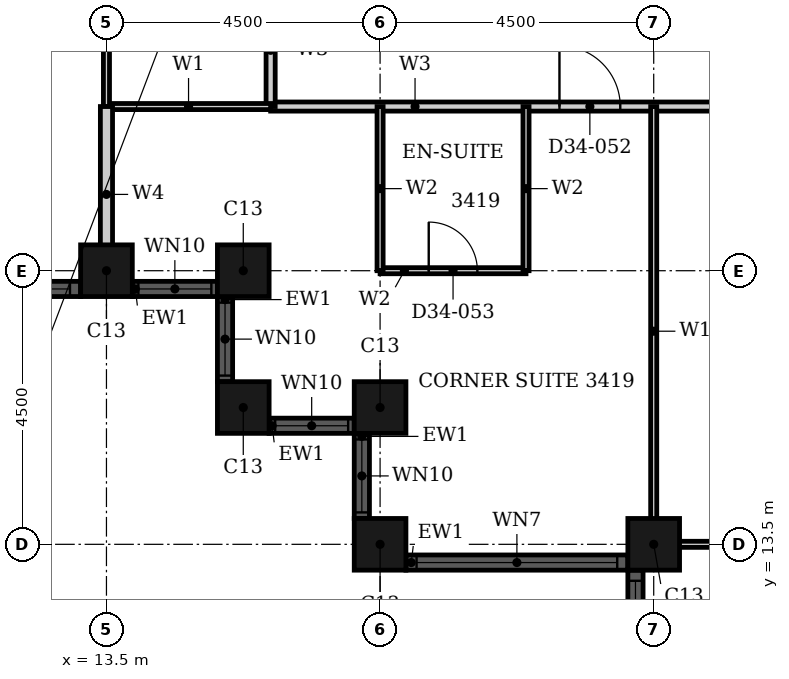
"""IFC4 building model, lengths in metres.
Left out: names, types, materials, properties, quantities, classifications, styles, units other than length and angle.
Written with IfcOpenShell. Run it as: python <this file> out.ifc"""

import sys

from ifc_helpers import new_model, si_unit, direction, frame, frame_2d, origin, origin_2d, place, context, subcontext, project, spatial, rectangle, hollow_rectangle, extrude, element, fill, save


model = new_model("IFC4")
c1 = context("Model", 3, precision=1e-05, world=origin(), true_north=direction((0.0, 1.0)))
c2 = subcontext(c1, "Body", "Model", "MODEL_VIEW")
j1 = project(units=[si_unit("LENGTHUNIT", "METRE"), si_unit("PLANEANGLEUNIT", "RADIAN")], contexts=[c1])
p1 = place(None, origin())
s1 = spatial("IfcSite", under=j1, at=p1, CompositionType="ELEMENT")
p2 = place(p1, origin())
s2 = spatial("IfcBuilding", under=s1, at=p2, CompositionType="ELEMENT")
p3 = place(p2, frame((0.0, 0.0, 136.8)))
s3 = spatial("IfcBuildingStorey", under=s2, at=p3, CompositionType="ELEMENT", Elevation=136.8)
for number, where, z_axis, x_axis in (
    (1, (13.5, 18.0, 0.0), (0.0, 0.0, 1.0), (1.0, 0.0, 0.0)),
    (2, (15.75, 18.0, 0.0), (0.0, 0.0, 1.0), (1.0, 0.0, 0.0)),
    (3, (15.75, 15.75, 0.0), (0.0, 0.0, 1.0), (1.0, 0.0, 0.0)),
    (4, (18.0, 15.75, 0.0), (0.0, 0.0, 1.0), (1.0, 0.0, 0.0)),
    (5, (18.0, 13.5, 0.0), (0.0, 0.0, 1.0), (1.0, 0.0, 0.0)),
    (6, (22.5, 13.5, 0.0), (0.0, 0.0, 1.0), (1.0, 0.0, 0.0)),
):
    element("IfcColumn", number, at=place(p3, frame(where, z_axis=z_axis, x_axis=x_axis)), inside=s3, PredefinedType="COLUMN", context=c2, shape_type="SweptSolid", body=[
        extrude(hollow_rectangle(XDim=0.85, YDim=0.85, WallThickness=0.026, at=origin_2d()), origin(), (0.0, 0.0, 1.0), 3.6),
    ])
p4 = place(p3, frame((4.925, 17.7, 0.0), z_axis=(0.0, 0.0, 1.0), x_axis=(1.0, 0.0, 0.0)))
e7 = element("IfcWall", 7, at=p4, inside=s3, PredefinedType="SOLIDWALL", context=c2, shape_type="SweptSolid", body=[
    extrude(rectangle(XDim=8.15, YDim=0.25, at=frame_2d((4.075, 0.0))), origin(), (0.0, 0.0, 1.0), 3.6),
])
p5 = place(p4, frame((0.175, 0.0, 0.9)))
e8 = element("IfcOpeningElement", 8, at=p5, cuts=e7, PredefinedType="OPENING", context=c2, shape_type="SweptSolid", body=[
    extrude(rectangle(XDim=3.3, YDim=1.85, at=frame_2d((1.65, 0.925))), frame((0.0, 0.135, 0.0), z_axis=(0.0, -1.0, 0.0), x_axis=(1.0, 0.0, 0.0)), (0.0, 0.0, 1.0), 0.27),
])
p6 = place(p4, frame((4.675, 0.0, 0.9)))
e9 = element("IfcOpeningElement", 9, at=p6, cuts=e7, PredefinedType="OPENING", context=c2, shape_type="SweptSolid", body=[
    extrude(rectangle(XDim=3.3, YDim=1.85, at=frame_2d((1.65, 0.925))), frame((0.0, 0.135, 0.0), z_axis=(0.0, -1.0, 0.0), x_axis=(1.0, 0.0, 0.0)), (0.0, 0.0, 1.0), 0.27),
])
p7 = place(p3, frame((13.925, 17.7, 0.0), z_axis=(0.0, 0.0, 1.0), x_axis=(1.0, 0.0, 0.0)))
e10 = element("IfcWall", 10, at=p7, inside=s3, PredefinedType="SOLIDWALL", context=c2, shape_type="SweptSolid", body=[
    extrude(rectangle(XDim=1.4, YDim=0.25, at=frame_2d((0.7, 0.0))), origin(), (0.0, 0.0, 1.0), 3.6),
])
p8 = place(p7, frame((0.1, 0.0, 0.9)))
e11 = element("IfcOpeningElement", 11, at=p8, cuts=e10, PredefinedType="OPENING", context=c2, shape_type="SweptSolid", body=[
    extrude(rectangle(XDim=1.2, YDim=1.85, at=frame_2d((0.6, 0.925))), frame((0.0, 0.135, 0.0), z_axis=(0.0, -1.0, 0.0), x_axis=(1.0, 0.0, 0.0)), (0.0, 0.0, 1.0), 0.27),
])
p9 = place(p3, frame((15.45, 17.575, 0.0), z_axis=(0.0, 0.0, 1.0), x_axis=(0.0, -1.0, 0.0)))
e12 = element("IfcWall", 12, at=p9, inside=s3, PredefinedType="SOLIDWALL", context=c2, shape_type="SweptSolid", body=[
    extrude(rectangle(XDim=1.4, YDim=0.25, at=frame_2d((0.7, 0.0))), origin(), (0.0, 0.0, 1.0), 3.6),
])
p10 = place(p9, frame((0.1, 0.0, 0.9)))
e13 = element("IfcOpeningElement", 13, at=p10, cuts=e12, PredefinedType="OPENING", context=c2, shape_type="SweptSolid", body=[
    extrude(rectangle(XDim=1.2, YDim=1.85, at=frame_2d((0.6, 0.925))), frame((0.0, 0.135, 0.0), z_axis=(0.0, -1.0, 0.0), x_axis=(1.0, 0.0, 0.0)), (0.0, 0.0, 1.0), 0.27),
])
p11 = place(p3, frame((16.175, 15.45, 0.0), z_axis=(0.0, 0.0, 1.0), x_axis=(1.0, 0.0, 0.0)))
e14 = element("IfcWall", 14, at=p11, inside=s3, PredefinedType="SOLIDWALL", context=c2, shape_type="SweptSolid", body=[
    extrude(rectangle(XDim=1.4, YDim=0.25, at=frame_2d((0.7, 0.0))), origin(), (0.0, 0.0, 1.0), 3.6),
])
p12 = place(p11, frame((0.1, 0.0, 0.9)))
e15 = element("IfcOpeningElement", 15, at=p12, cuts=e14, PredefinedType="OPENING", context=c2, shape_type="SweptSolid", body=[
    extrude(rectangle(XDim=1.2, YDim=1.85, at=frame_2d((0.6, 0.925))), frame((0.0, 0.135, 0.0), z_axis=(0.0, -1.0, 0.0), x_axis=(1.0, 0.0, 0.0)), (0.0, 0.0, 1.0), 0.27),
])
p13 = place(p3, frame((17.7, 15.325, 0.0), z_axis=(0.0, 0.0, 1.0), x_axis=(0.0, -1.0, 0.0)))
e16 = element("IfcWall", 16, at=p13, inside=s3, PredefinedType="SOLIDWALL", context=c2, shape_type="SweptSolid", body=[
    extrude(rectangle(XDim=1.4, YDim=0.25, at=frame_2d((0.7, 0.0))), origin(), (0.0, 0.0, 1.0), 3.6),
])
p14 = place(p13, frame((0.1, 0.0, 0.9)))
e17 = element("IfcOpeningElement", 17, at=p14, cuts=e16, PredefinedType="OPENING", context=c2, shape_type="SweptSolid", body=[
    extrude(rectangle(XDim=1.2, YDim=1.85, at=frame_2d((0.6, 0.925))), frame((0.0, 0.135, 0.0), z_axis=(0.0, -1.0, 0.0), x_axis=(1.0, 0.0, 0.0)), (0.0, 0.0, 1.0), 0.27),
])
p15 = place(p3, frame((18.425, 13.2, 0.0), z_axis=(0.0, 0.0, 1.0), x_axis=(1.0, 0.0, 0.0)))
e18 = element("IfcWall", 18, at=p15, inside=s3, PredefinedType="SOLIDWALL", context=c2, shape_type="SweptSolid", body=[
    extrude(rectangle(XDim=3.65, YDim=0.25, at=frame_2d((1.825, 0.0))), origin(), (0.0, 0.0, 1.0), 3.6),
])
p16 = place(p15, frame((0.175, 0.0, 0.9)))
e19 = element("IfcOpeningElement", 19, at=p16, cuts=e18, PredefinedType="OPENING", context=c2, shape_type="SweptSolid", body=[
    extrude(rectangle(XDim=3.3, YDim=1.85, at=frame_2d((1.65, 0.925))), frame((0.0, 0.135, 0.0), z_axis=(0.0, -1.0, 0.0), x_axis=(1.0, 0.0, 0.0)), (0.0, 0.0, 1.0), 0.27),
])
p17 = place(p3, frame((22.2, 13.075, 0.0), z_axis=(0.0, 0.0, 1.0), x_axis=(0.0, -1.0, 0.0)))
e20 = element("IfcWall", 20, at=p17, inside=s3, PredefinedType="SOLIDWALL", context=c2, shape_type="SweptSolid", body=[
    extrude(rectangle(XDim=8.15, YDim=0.25, at=frame_2d((4.075, 0.0))), origin(), (0.0, 0.0, 1.0), 3.6),
])
p18 = place(p17, frame((0.175, 0.0, 0.9)))
e21 = element("IfcOpeningElement", 21, at=p18, cuts=e20, PredefinedType="OPENING", context=c2, shape_type="SweptSolid", body=[
    extrude(rectangle(XDim=3.3, YDim=1.85, at=frame_2d((1.65, 0.925))), frame((0.0, 0.135, 0.0), z_axis=(0.0, -1.0, 0.0), x_axis=(1.0, 0.0, 0.0)), (0.0, 0.0, 1.0), 0.27),
])
p19 = place(p17, frame((4.675, 0.0, 0.9)))
e22 = element("IfcOpeningElement", 22, at=p19, cuts=e20, PredefinedType="OPENING", context=c2, shape_type="SweptSolid", body=[
    extrude(rectangle(XDim=3.3, YDim=1.85, at=frame_2d((1.65, 0.925))), frame((0.0, 0.135, 0.0), z_axis=(0.0, -1.0, 0.0), x_axis=(1.0, 0.0, 0.0)), (0.0, 0.0, 1.0), 0.27),
])
p20 = place(p3, frame((16.2, 20.7, 0.0), z_axis=(0.0, 0.0, 1.0), x_axis=(1.0, 0.0, 0.0)))
e23 = element("IfcWall", 23, at=p20, inside=s3, PredefinedType="PARTITIONING", context=c2, shape_type="SweptSolid", body=[
    extrude(rectangle(XDim=13.5, YDim=0.15, at=frame_2d((6.75, 0.0))), origin(), (0.0, 0.0, 1.0), 3.2),
])
p21 = place(p20, frame((4.75, 0.0, 0.0)))
e24 = element("IfcOpeningElement", 24, at=p21, cuts=e23, PredefinedType="OPENING", context=c2, shape_type="SweptSolid", body=[
    extrude(rectangle(XDim=1.0, YDim=2.1, at=frame_2d((0.5, 1.05))), frame((0.0, 0.085, 0.0), z_axis=(0.0, -1.0, 0.0), x_axis=(1.0, 0.0, 0.0)), (0.0, 0.0, 1.0), 0.17),
])
p22 = place(p20, frame((9.45, 0.0, 0.0)))
e25 = element("IfcOpeningElement", 25, at=p22, cuts=e23, PredefinedType="OPENING", context=c2, shape_type="SweptSolid", body=[
    extrude(rectangle(XDim=0.9, YDim=2.1, at=frame_2d((0.45, 1.05))), frame((0.0, 0.085, 0.0), z_axis=(0.0, -1.0, 0.0), x_axis=(1.0, 0.0, 0.0)), (0.0, 0.0, 1.0), 0.17),
])
p23 = place(p3, frame((16.2, 20.7, 0.0), z_axis=(0.0, 0.0, 1.0), x_axis=(0.0, 1.0, 0.0)))
e26 = element("IfcWall", 26, at=p23, inside=s3, PredefinedType="PARTITIONING", context=c2, shape_type="SweptSolid", body=[
    extrude(rectangle(XDim=4.5, YDim=0.15, at=frame_2d((2.25, 0.0))), origin(), (0.0, 0.0, 1.0), 3.2),
])
p24 = place(p23, frame((1.85, 0.0, 0.0)))
e27 = element("IfcOpeningElement", 27, at=p24, cuts=e26, PredefinedType="OPENING", context=c2, shape_type="SweptSolid", body=[
    extrude(rectangle(XDim=0.9, YDim=2.1, at=frame_2d((0.45, 1.05))), frame((0.0, 0.085, 0.0), z_axis=(0.0, -1.0, 0.0), x_axis=(1.0, 0.0, 0.0)), (0.0, 0.0, 1.0), 0.17),
])
p25 = place(p3, frame((22.31, 13.5, 0.0), z_axis=(0.0, 0.0, 1.0), x_axis=(1.0, 0.0, 0.0)))
e28 = element("IfcWall", 28, at=p25, inside=s3, PredefinedType="PARTITIONING", context=c2, shape_type="SweptSolid", body=[
    extrude(rectangle(XDim=7.39, YDim=0.1, at=frame_2d((3.695, 0.0))), origin(), (0.0, 0.0, 1.0), 2.28),
])
p26 = place(p3, frame((13.5, 20.7, 0.0), z_axis=(0.0, 0.0, 1.0), x_axis=(1.0, 0.0, 0.0)))
e29 = element("IfcWall", 29, at=p26, inside=s3, PredefinedType="PARTITIONING", context=c2, shape_type="SweptSolid", body=[
    extrude(rectangle(XDim=2.7, YDim=0.1, at=frame_2d((1.35, 0.0))), origin(), (0.0, 0.0, 1.0), 3.2),
])
p27 = place(p3, frame((13.5, 20.7, 0.0), z_axis=(0.0, 0.0, 1.0), x_axis=(0.0, 1.0, 0.0)))
e30 = element("IfcWall", 30, at=p27, inside=s3, PredefinedType="PARTITIONING", context=c2, shape_type="SweptSolid", body=[
    extrude(rectangle(XDim=4.5, YDim=0.1, at=frame_2d((2.25, 0.0))), origin(), (0.0, 0.0, 1.0), 2.28),
])
p28 = place(p3, frame((22.5, 13.31, 0.0), z_axis=(0.0, 0.0, 1.0), x_axis=(0.0, 1.0, 0.0)))
e31 = element("IfcWall", 31, at=p28, inside=s3, PredefinedType="PARTITIONING", context=c2, shape_type="SweptSolid", body=[
    extrude(rectangle(XDim=7.39, YDim=0.1, at=frame_2d((3.695, 0.0))), origin(), (0.0, 0.0, 1.0), 3.2),
])
p29 = place(p3, frame((13.5, 17.81, 0.0), z_axis=(0.0, 0.0, 1.0), x_axis=(0.0, 1.0, 0.0)))
e32 = element("IfcWall", 32, at=p29, inside=s3, PredefinedType="PARTITIONING", context=c2, shape_type="SweptSolid", body=[
    extrude(rectangle(XDim=2.89, YDim=0.2, at=frame_2d((1.445, 0.0))), origin(), (0.0, 0.0, 1.0), 2.28),
])
p30 = place(p3, frame((18.0, 18.0, 0.0), z_axis=(0.0, 0.0, 1.0), x_axis=(1.0, 0.0, 0.0)))
e33 = element("IfcWall", 33, at=p30, inside=s3, PredefinedType="PARTITIONING", context=c2, shape_type="SweptSolid", body=[
    extrude(rectangle(XDim=2.4, YDim=0.1, at=frame_2d((1.2, 0.0))), origin(), (0.0, 0.0, 1.0), 3.2),
])
p31 = place(p30, frame((0.8, 0.0, 0.0)))
e34 = element("IfcOpeningElement", 34, at=p31, cuts=e33, PredefinedType="OPENING", context=c2, shape_type="SweptSolid", body=[
    extrude(rectangle(XDim=0.8, YDim=2.1, at=frame_2d((0.4, 1.05))), frame((0.0, 0.06, 0.0), z_axis=(0.0, -1.0, 0.0), x_axis=(1.0, 0.0, 0.0)), (0.0, 0.0, 1.0), 0.12),
])
for number, where, z_axis, x_axis in (
    (35, (18.0, 18.0, 0.0), (0.0, 0.0, 1.0), (0.0, 1.0, 0.0)),
    (36, (20.4, 18.0, 0.0), (0.0, 0.0, 1.0), (0.0, 1.0, 0.0)),
):
    element("IfcWall", number, at=place(p3, frame(where, z_axis=z_axis, x_axis=x_axis)), inside=s3, PredefinedType="PARTITIONING", context=c2, shape_type="SweptSolid", body=[
        extrude(rectangle(XDim=2.7, YDim=0.1, at=frame_2d((1.35, 0.0))), origin(), (0.0, 0.0, 1.0), 3.2),
    ])
p32 = place(p6, origin())
e37 = element("IfcWindow", 37, at=p32, inside=s3, PartitioningType="SINGLE_PANEL", PredefinedType="WINDOW", context=c2, shape_type="SweptSolid", body=[
    extrude(rectangle(XDim=3.3, YDim=1.85, at=frame_2d((1.65, 0.925))), frame((0.0, 0.03, 0.0), z_axis=(0.0, -1.0, 0.0), x_axis=(1.0, 0.0, 0.0)), (0.0, 0.0, 1.0), 0.06),
])
fill(e9, e37)
p33 = place(p8, origin())
e38 = element("IfcWindow", 38, at=p33, inside=s3, PartitioningType="SINGLE_PANEL", PredefinedType="WINDOW", context=c2, shape_type="SweptSolid", body=[
    extrude(rectangle(XDim=1.2, YDim=1.85, at=frame_2d((0.6, 0.925))), frame((0.0, 0.03, 0.0), z_axis=(0.0, -1.0, 0.0), x_axis=(1.0, 0.0, 0.0)), (0.0, 0.0, 1.0), 0.06),
])
fill(e11, e38)
p34 = place(p10, origin())
e39 = element("IfcWindow", 39, at=p34, inside=s3, PartitioningType="SINGLE_PANEL", PredefinedType="WINDOW", context=c2, shape_type="SweptSolid", body=[
    extrude(rectangle(XDim=1.2, YDim=1.85, at=frame_2d((0.6, 0.925))), frame((0.0, 0.03, 0.0), z_axis=(0.0, -1.0, 0.0), x_axis=(1.0, 0.0, 0.0)), (0.0, 0.0, 1.0), 0.06),
])
fill(e13, e39)
p35 = place(p12, origin())
e40 = element("IfcWindow", 40, at=p35, inside=s3, PartitioningType="SINGLE_PANEL", PredefinedType="WINDOW", context=c2, shape_type="SweptSolid", body=[
    extrude(rectangle(XDim=1.2, YDim=1.85, at=frame_2d((0.6, 0.925))), frame((0.0, 0.03, 0.0), z_axis=(0.0, -1.0, 0.0), x_axis=(1.0, 0.0, 0.0)), (0.0, 0.0, 1.0), 0.06),
])
fill(e15, e40)
p36 = place(p14, origin())
e41 = element("IfcWindow", 41, at=p36, inside=s3, PartitioningType="SINGLE_PANEL", PredefinedType="WINDOW", context=c2, shape_type="SweptSolid", body=[
    extrude(rectangle(XDim=1.2, YDim=1.85, at=frame_2d((0.6, 0.925))), frame((0.0, 0.03, 0.0), z_axis=(0.0, -1.0, 0.0), x_axis=(1.0, 0.0, 0.0)), (0.0, 0.0, 1.0), 0.06),
])
fill(e17, e41)
p37 = place(p16, origin())
e42 = element("IfcWindow", 42, at=p37, inside=s3, PartitioningType="SINGLE_PANEL", PredefinedType="WINDOW", context=c2, shape_type="SweptSolid", body=[
    extrude(rectangle(XDim=3.3, YDim=1.85, at=frame_2d((1.65, 0.925))), frame((0.0, 0.03, 0.0), z_axis=(0.0, -1.0, 0.0), x_axis=(1.0, 0.0, 0.0)), (0.0, 0.0, 1.0), 0.06),
])
fill(e19, e42)
p38 = place(p18, origin())
e43 = element("IfcWindow", 43, at=p38, inside=s3, PartitioningType="SINGLE_PANEL", PredefinedType="WINDOW", context=c2, shape_type="SweptSolid", body=[
    extrude(rectangle(XDim=3.3, YDim=1.85, at=frame_2d((1.65, 0.925))), frame((0.0, 0.03, 0.0), z_axis=(0.0, -1.0, 0.0), x_axis=(1.0, 0.0, 0.0)), (0.0, 0.0, 1.0), 0.06),
])
fill(e21, e43)
p39 = place(p21, origin())
e44 = element("IfcDoor", 44, at=p39, inside=s3, OperationType="SINGLE_SWING_RIGHT", PredefinedType="DOOR", context=c2, shape_type="SweptSolid", body=[
    extrude(rectangle(XDim=1.0, YDim=2.1, at=frame_2d((0.5, 1.05))), frame((0.0, 0.025, 0.0), z_axis=(0.0, -1.0, 0.0), x_axis=(1.0, 0.0, 0.0)), (0.0, 0.0, 1.0), 0.05),
])
fill(e24, e44)
p40 = place(p31, origin())
e45 = element("IfcDoor", 45, at=p40, inside=s3, OperationType="SINGLE_SWING_RIGHT", PredefinedType="DOOR", context=c2, shape_type="SweptSolid", body=[
    extrude(rectangle(XDim=0.8, YDim=2.1, at=frame_2d((0.4, 1.05))), frame((0.0, 0.025, 0.0), z_axis=(0.0, -1.0, 0.0), x_axis=(1.0, 0.0, 0.0)), (0.0, 0.0, 1.0), 0.05),
])
fill(e34, e45)
save(model, sys.argv[1])
